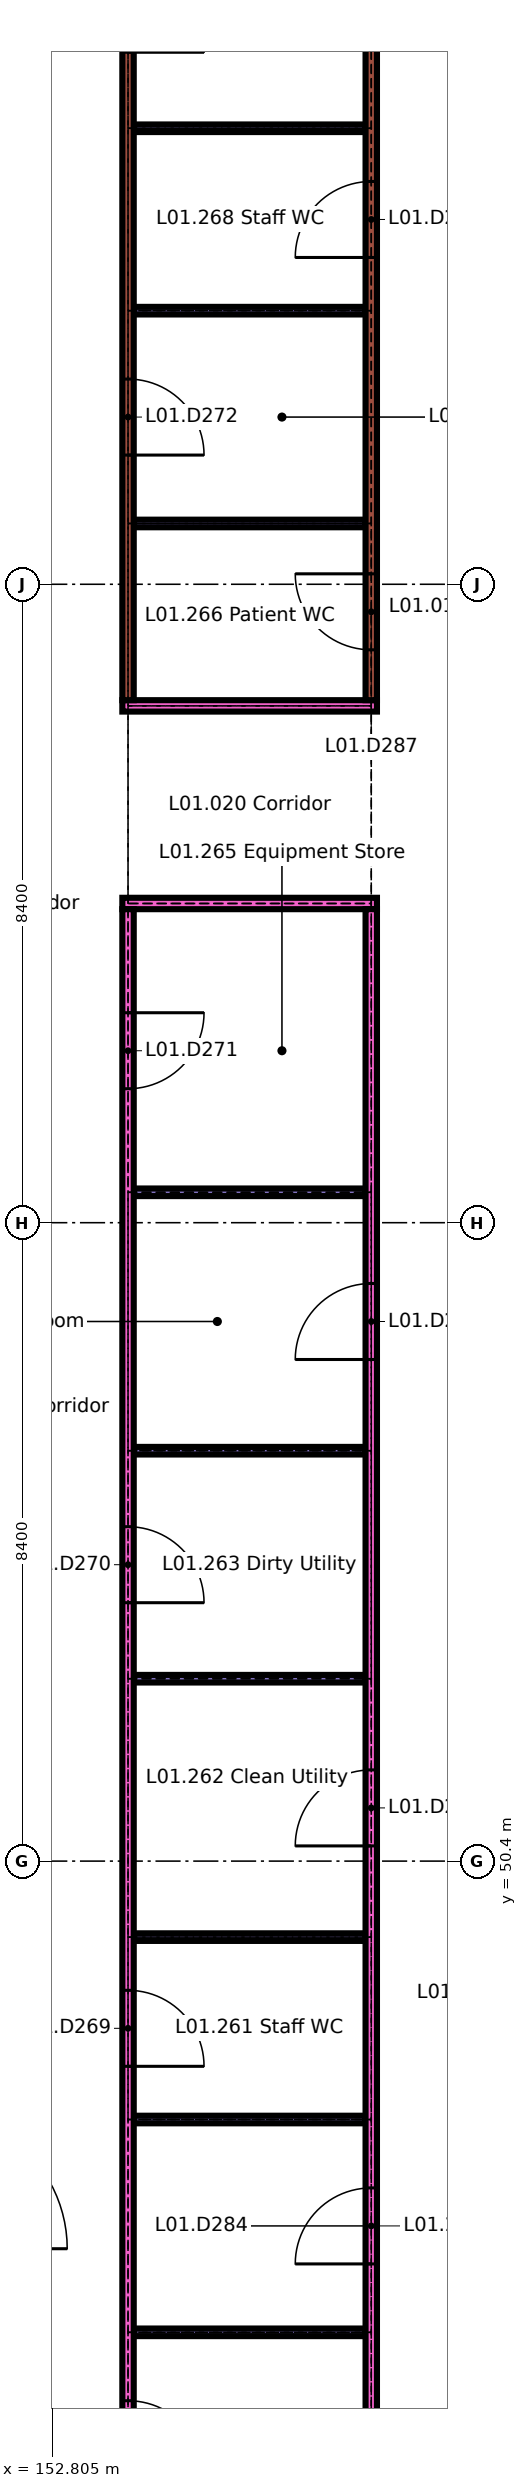
"""IFC4 building model, lengths in metres.
Left out: names, types, materials, properties, quantities, classifications, styles, units other than length and angle.
Written with IfcOpenShell. Run it as: python <this file> out.ifc"""

import sys

from ifc_helpers import new_model, si_unit, direction, frame, frame_2d, origin, place, context, subcontext, project, spatial, rectangle, extrude, element, fill, save


model = new_model("IFC4")
c1 = context("Model", 3, precision=1e-05, world=origin(), true_north=direction((0.0, 1.0)))
c2 = subcontext(c1, "Body", "Model", "MODEL_VIEW")
j1 = project(units=[si_unit("LENGTHUNIT", "METRE"), si_unit("PLANEANGLEUNIT", "RADIAN")], contexts=[c1])
p1 = place(None, origin())
s1 = spatial("IfcSite", under=j1, at=p1, CompositionType="ELEMENT")
p2 = place(p1, origin())
s2 = spatial("IfcBuilding", under=s1, at=p2, CompositionType="ELEMENT")
p3 = place(p2, frame((0.0, 0.0, 4.5)))
s3 = spatial("IfcBuildingStorey", under=s2, at=p3, CompositionType="ELEMENT", Elevation=4.5)
for number, where, z_axis, x_axis in (
    (1, (153.875, 44.2, 0.0), (0.0, 0.0, 1.0), (1.0, 0.0, 0.0)),
    (2, (153.875, 47.0, 0.0), (0.0, 0.0, 1.0), (1.0, 0.0, 0.0)),
    (3, (153.875, 49.4, 0.0), (0.0, 0.0, 1.0), (1.0, 0.0, 0.0)),
    (4, (153.875, 52.8, 0.0), (0.0, 0.0, 1.0), (1.0, 0.0, 0.0)),
    (5, (153.875, 55.8, 0.0), (0.0, 0.0, 1.0), (1.0, 0.0, 0.0)),
    (6, (153.875, 59.2, 0.0), (0.0, 0.0, 1.0), (1.0, 0.0, 0.0)),
):
    element("IfcWall", number, at=place(p3, frame(where, z_axis=z_axis, x_axis=x_axis)), inside=s3, PredefinedType="PARTITIONING", context=c2, shape_type="SweptSolid", body=[
        extrude(rectangle(XDim=3.05, YDim=0.1, at=frame_2d((1.525, 0.0))), origin(), (0.0, 0.0, 1.0), 3.6),
    ])
for number, where, z_axis, x_axis in (
    (7, (153.725, 63.0, 0.0), (0.0, 0.0, 1.0), (1.0, 0.0, 0.0)),
    (8, (153.725, 65.6, 0.0), (0.0, 0.0, 1.0), (1.0, 0.0, 0.0)),
):
    element("IfcWall", number, at=place(p3, frame(where, z_axis=z_axis, x_axis=x_axis)), inside=s3, PredefinedType="PARTITIONING", context=c2, shape_type="SweptSolid", body=[
        extrude(rectangle(XDim=3.35, YDim=0.15, at=frame_2d((1.675, 0.0))), origin(), (0.0, 0.0, 1.0), 3.6),
    ])
for number, where, z_axis, x_axis in (
    (9, (153.875, 68.0, 0.0), (0.0, 0.0, 1.0), (1.0, 0.0, 0.0)),
    (10, (153.875, 70.8, 0.0), (0.0, 0.0, 1.0), (1.0, 0.0, 0.0)),
    (11, (153.875, 73.2, 0.0), (0.0, 0.0, 1.0), (1.0, 0.0, 0.0)),
):
    element("IfcWall", number, at=place(p3, frame(where, z_axis=z_axis, x_axis=x_axis)), inside=s3, PredefinedType="PARTITIONING", context=c2, shape_type="SweptSolid", body=[
        extrude(rectangle(XDim=3.05, YDim=0.1, at=frame_2d((1.525, 0.0))), origin(), (0.0, 0.0, 1.0), 3.6),
    ])
p4 = place(p3, frame((153.8, 36.275, 0.0), z_axis=(0.0, 0.0, 1.0), x_axis=(0.0, 1.0, 0.0)))
e12 = element("IfcWall", 12, at=p4, inside=s3, PredefinedType="PARTITIONING", context=c2, shape_type="SweptSolid", body=[
    extrude(rectangle(XDim=26.65, YDim=0.15, at=frame_2d((13.325, 0.0))), origin(), (0.0, 0.0, 1.0), 3.6),
])
p5 = place(p4, frame((0.663, 0.0, 0.0)))
e13 = element("IfcOpeningElement", 13, at=p5, cuts=e12, PredefinedType="OPENING", context=c2, shape_type="SweptSolid", body=[
    extrude(rectangle(XDim=1.0, YDim=2.1, at=frame_2d((0.5, 1.05))), frame((0.0, 0.085, 0.0), z_axis=(0.0, -1.0, 0.0), x_axis=(1.0, 0.0, 0.0)), (0.0, 0.0, 1.0), 0.17),
])
p6 = place(p4, frame((6.025, 0.0, 0.0)))
e14 = element("IfcOpeningElement", 14, at=p6, cuts=e12, PredefinedType="OPENING", context=c2, shape_type="SweptSolid", body=[
    extrude(rectangle(XDim=1.0, YDim=2.1, at=frame_2d((0.5, 1.05))), frame((0.0, 0.085, 0.0), z_axis=(0.0, -1.0, 0.0), x_axis=(1.0, 0.0, 0.0)), (0.0, 0.0, 1.0), 0.17),
])
p7 = place(p4, frame((11.425, 0.0, 0.0)))
e15 = element("IfcOpeningElement", 15, at=p7, cuts=e12, PredefinedType="OPENING", context=c2, shape_type="SweptSolid", body=[
    extrude(rectangle(XDim=1.0, YDim=2.1, at=frame_2d((0.5, 1.05))), frame((0.0, 0.085, 0.0), z_axis=(0.0, -1.0, 0.0), x_axis=(1.0, 0.0, 0.0)), (0.0, 0.0, 1.0), 0.17),
])
p8 = place(p4, frame((17.525, 0.0, 0.0)))
e16 = element("IfcOpeningElement", 16, at=p8, cuts=e12, PredefinedType="OPENING", context=c2, shape_type="SweptSolid", body=[
    extrude(rectangle(XDim=1.0, YDim=2.1, at=frame_2d((0.5, 1.05))), frame((0.0, 0.085, 0.0), z_axis=(0.0, -1.0, 0.0), x_axis=(1.0, 0.0, 0.0)), (0.0, 0.0, 1.0), 0.17),
])
p9 = place(p4, frame((24.288, 0.0, 0.0)))
e17 = element("IfcOpeningElement", 17, at=p9, cuts=e12, PredefinedType="OPENING", context=c2, shape_type="SweptSolid", body=[
    extrude(rectangle(XDim=1.0, YDim=2.1, at=frame_2d((0.5, 1.05))), frame((0.0, 0.085, 0.0), z_axis=(0.0, -1.0, 0.0), x_axis=(1.0, 0.0, 0.0)), (0.0, 0.0, 1.0), 0.17),
])
p10 = place(p3, frame((153.8, 65.675, 0.0), z_axis=(0.0, 0.0, 1.0), x_axis=(0.0, 1.0, 0.0)))
e18 = element("IfcWall", 18, at=p10, inside=s3, PredefinedType="PARTITIONING", context=c2, shape_type="SweptSolid", body=[
    extrude(rectangle(XDim=25.25, YDim=0.15, at=frame_2d((12.625, 0.0))), origin(), (0.0, 0.0, 1.0), 3.45),
])
p11 = place(p10, frame((3.225, 0.0, 0.0)))
e19 = element("IfcOpeningElement", 19, at=p11, cuts=e18, PredefinedType="OPENING", context=c2, shape_type="SweptSolid", body=[
    extrude(rectangle(XDim=1.0, YDim=2.1, at=frame_2d((0.5, 1.05))), frame((0.0, 0.085, 0.0), z_axis=(0.0, -1.0, 0.0), x_axis=(1.0, 0.0, 0.0)), (0.0, 0.0, 1.0), 0.17),
])
p12 = place(p10, frame((8.525, 0.0, 0.0)))
e20 = element("IfcOpeningElement", 20, at=p12, cuts=e18, PredefinedType="OPENING", context=c2, shape_type="SweptSolid", body=[
    extrude(rectangle(XDim=1.0, YDim=2.1, at=frame_2d((0.5, 1.05))), frame((0.0, 0.085, 0.0), z_axis=(0.0, -1.0, 0.0), x_axis=(1.0, 0.0, 0.0)), (0.0, 0.0, 1.0), 0.17),
])
p13 = place(p10, frame((14.525, 0.0, 0.0)))
e21 = element("IfcOpeningElement", 21, at=p13, cuts=e18, PredefinedType="OPENING", context=c2, shape_type="SweptSolid", body=[
    extrude(rectangle(XDim=1.0, YDim=2.1, at=frame_2d((0.5, 1.05))), frame((0.0, 0.085, 0.0), z_axis=(0.0, -1.0, 0.0), x_axis=(1.0, 0.0, 0.0)), (0.0, 0.0, 1.0), 0.17),
])
p14 = place(p10, frame((20.125, 0.0, 0.0)))
e22 = element("IfcOpeningElement", 22, at=p14, cuts=e18, PredefinedType="OPENING", context=c2, shape_type="SweptSolid", body=[
    extrude(rectangle(XDim=1.0, YDim=2.1, at=frame_2d((0.5, 1.05))), frame((0.0, 0.085, 0.0), z_axis=(0.0, -1.0, 0.0), x_axis=(1.0, 0.0, 0.0)), (0.0, 0.0, 1.0), 0.17),
])
p15 = place(p3, frame((157.0, 36.275, 0.0), z_axis=(0.0, 0.0, 1.0), x_axis=(0.0, 1.0, 0.0)))
e23 = element("IfcWall", 23, at=p15, inside=s3, PredefinedType="PARTITIONING", context=c2, shape_type="SweptSolid", body=[
    extrude(rectangle(XDim=26.65, YDim=0.15, at=frame_2d((13.325, 0.0))), origin(), (0.0, 0.0, 1.0), 3.6),
])
p16 = place(p15, frame((3.225, 0.0, 0.0)))
e24 = element("IfcOpeningElement", 24, at=p16, cuts=e23, PredefinedType="OPENING", context=c2, shape_type="SweptSolid", body=[
    extrude(rectangle(XDim=1.0, YDim=2.1, at=frame_2d((0.5, 1.05))), frame((0.0, 0.085, 0.0), z_axis=(0.0, -1.0, 0.0), x_axis=(1.0, 0.0, 0.0)), (0.0, 0.0, 1.0), 0.17),
])
p17 = place(p15, frame((8.825, 0.0, 0.0)))
e25 = element("IfcOpeningElement", 25, at=p17, cuts=e23, PredefinedType="OPENING", context=c2, shape_type="SweptSolid", body=[
    extrude(rectangle(XDim=1.0, YDim=2.1, at=frame_2d((0.5, 1.05))), frame((0.0, 0.085, 0.0), z_axis=(0.0, -1.0, 0.0), x_axis=(1.0, 0.0, 0.0)), (0.0, 0.0, 1.0), 0.17),
])
p18 = place(p15, frame((14.325, 0.0, 0.0)))
e26 = element("IfcOpeningElement", 26, at=p18, cuts=e23, PredefinedType="OPENING", context=c2, shape_type="SweptSolid", body=[
    extrude(rectangle(XDim=1.0, YDim=2.1, at=frame_2d((0.5, 1.05))), frame((0.0, 0.085, 0.0), z_axis=(0.0, -1.0, 0.0), x_axis=(1.0, 0.0, 0.0)), (0.0, 0.0, 1.0), 0.17),
])
p19 = place(p15, frame((20.725, 0.0, 0.0)))
e27 = element("IfcOpeningElement", 27, at=p19, cuts=e23, PredefinedType="OPENING", context=c2, shape_type="SweptSolid", body=[
    extrude(rectangle(XDim=1.0, YDim=2.1, at=frame_2d((0.5, 1.05))), frame((0.0, 0.085, 0.0), z_axis=(0.0, -1.0, 0.0), x_axis=(1.0, 0.0, 0.0)), (0.0, 0.0, 1.0), 0.17),
])
p20 = place(p3, frame((157.0, 65.675, 0.0), z_axis=(0.0, 0.0, 1.0), x_axis=(0.0, 1.0, 0.0)))
e28 = element("IfcWall", 28, at=p20, inside=s3, PredefinedType="PARTITIONING", context=c2, shape_type="SweptSolid", body=[
    extrude(rectangle(XDim=25.25, YDim=0.15, at=frame_2d((12.625, 0.0))), origin(), (0.0, 0.0, 1.0), 3.45),
])
p21 = place(p20, frame((0.663, 0.0, 0.0)))
e29 = element("IfcOpeningElement", 29, at=p21, cuts=e28, PredefinedType="OPENING", context=c2, shape_type="SweptSolid", body=[
    extrude(rectangle(XDim=1.0, YDim=2.1, at=frame_2d((0.5, 1.05))), frame((0.0, 0.085, 0.0), z_axis=(0.0, -1.0, 0.0), x_axis=(1.0, 0.0, 0.0)), (0.0, 0.0, 1.0), 0.17),
])
p22 = place(p20, frame((5.825, 0.0, 0.0)))
e30 = element("IfcOpeningElement", 30, at=p22, cuts=e28, PredefinedType="OPENING", context=c2, shape_type="SweptSolid", body=[
    extrude(rectangle(XDim=1.0, YDim=2.1, at=frame_2d((0.5, 1.05))), frame((0.0, 0.085, 0.0), z_axis=(0.0, -1.0, 0.0), x_axis=(1.0, 0.0, 0.0)), (0.0, 0.0, 1.0), 0.17),
])
p23 = place(p20, frame((11.525, 0.0, 0.0)))
e31 = element("IfcOpeningElement", 31, at=p23, cuts=e28, PredefinedType="OPENING", context=c2, shape_type="SweptSolid", body=[
    extrude(rectangle(XDim=1.0, YDim=2.1, at=frame_2d((0.5, 1.05))), frame((0.0, 0.085, 0.0), z_axis=(0.0, -1.0, 0.0), x_axis=(1.0, 0.0, 0.0)), (0.0, 0.0, 1.0), 0.17),
])
p24 = place(p20, frame((17.225, 0.0, 0.0)))
e32 = element("IfcOpeningElement", 32, at=p24, cuts=e28, PredefinedType="OPENING", context=c2, shape_type="SweptSolid", body=[
    extrude(rectangle(XDim=1.0, YDim=2.1, at=frame_2d((0.5, 1.05))), frame((0.0, 0.085, 0.0), z_axis=(0.0, -1.0, 0.0), x_axis=(1.0, 0.0, 0.0)), (0.0, 0.0, 1.0), 0.17),
])
p25 = place(p20, frame((23.288, 0.0, 0.0)))
e33 = element("IfcOpeningElement", 33, at=p25, cuts=e28, PredefinedType="OPENING", context=c2, shape_type="SweptSolid", body=[
    extrude(rectangle(XDim=1.0, YDim=2.1, at=frame_2d((0.5, 1.05))), frame((0.0, 0.085, 0.0), z_axis=(0.0, -1.0, 0.0), x_axis=(1.0, 0.0, 0.0)), (0.0, 0.0, 1.0), 0.17),
])
p26 = place(p6, origin())
e34 = element("IfcDoor", 34, at=p26, inside=s3, OperationType="SINGLE_SWING_LEFT", PredefinedType="DOOR", context=c2, shape_type="SweptSolid", body=[
    extrude(rectangle(XDim=1.0, YDim=2.1, at=frame_2d((0.5, 1.05))), frame((0.0, 0.025, 0.0), z_axis=(0.0, -1.0, 0.0), x_axis=(1.0, 0.0, 0.0)), (0.0, 0.0, 1.0), 0.05),
])
fill(e14, e34)
p27 = place(p7, origin())
e35 = element("IfcDoor", 35, at=p27, inside=s3, OperationType="SINGLE_SWING_LEFT", PredefinedType="DOOR", context=c2, shape_type="SweptSolid", body=[
    extrude(rectangle(XDim=1.0, YDim=2.1, at=frame_2d((0.5, 1.05))), frame((0.0, 0.025, 0.0), z_axis=(0.0, -1.0, 0.0), x_axis=(1.0, 0.0, 0.0)), (0.0, 0.0, 1.0), 0.05),
])
fill(e15, e35)
p28 = place(p8, origin())
e36 = element("IfcDoor", 36, at=p28, inside=s3, OperationType="SINGLE_SWING_LEFT", PredefinedType="DOOR", context=c2, shape_type="SweptSolid", body=[
    extrude(rectangle(XDim=1.0, YDim=2.1, at=frame_2d((0.5, 1.05))), frame((0.0, 0.025, 0.0), z_axis=(0.0, -1.0, 0.0), x_axis=(1.0, 0.0, 0.0)), (0.0, 0.0, 1.0), 0.05),
])
fill(e16, e36)
p29 = place(p9, origin())
e37 = element("IfcDoor", 37, at=p29, inside=s3, OperationType="SINGLE_SWING_RIGHT", PredefinedType="DOOR", context=c2, shape_type="SweptSolid", body=[
    extrude(rectangle(XDim=1.0, YDim=2.1, at=frame_2d((0.5, 1.05))), frame((0.0, 0.025, 0.0), z_axis=(0.0, -1.0, 0.0), x_axis=(1.0, 0.0, 0.0)), (0.0, 0.0, 1.0), 0.05),
])
fill(e17, e37)
p30 = place(p11, origin())
e38 = element("IfcDoor", 38, at=p30, inside=s3, OperationType="SINGLE_SWING_LEFT", PredefinedType="DOOR", context=c2, shape_type="SweptSolid", body=[
    extrude(rectangle(XDim=1.0, YDim=2.1, at=frame_2d((0.5, 1.05))), frame((0.0, 0.025, 0.0), z_axis=(0.0, -1.0, 0.0), x_axis=(1.0, 0.0, 0.0)), (0.0, 0.0, 1.0), 0.05),
])
fill(e19, e38)
p31 = place(p17, origin())
e39 = element("IfcDoor", 39, at=p31, inside=s3, OperationType="SINGLE_SWING_RIGHT", PredefinedType="DOOR", context=c2, shape_type="SweptSolid", body=[
    extrude(rectangle(XDim=1.0, YDim=2.1, at=frame_2d((0.5, 1.05))), frame((0.0, 0.025, 0.0), z_axis=(0.0, -1.0, 0.0), x_axis=(1.0, 0.0, 0.0)), (0.0, 0.0, 1.0), 0.05),
])
fill(e25, e39)
p32 = place(p18, origin())
e40 = element("IfcDoor", 40, at=p32, inside=s3, OperationType="SINGLE_SWING_RIGHT", PredefinedType="DOOR", context=c2, shape_type="SweptSolid", body=[
    extrude(rectangle(XDim=1.0, YDim=2.1, at=frame_2d((0.5, 1.05))), frame((0.0, 0.025, 0.0), z_axis=(0.0, -1.0, 0.0), x_axis=(1.0, 0.0, 0.0)), (0.0, 0.0, 1.0), 0.05),
])
fill(e26, e40)
p33 = place(p19, origin())
e41 = element("IfcDoor", 41, at=p33, inside=s3, OperationType="SINGLE_SWING_RIGHT", PredefinedType="DOOR", context=c2, shape_type="SweptSolid", body=[
    extrude(rectangle(XDim=1.0, YDim=2.1, at=frame_2d((0.5, 1.05))), frame((0.0, 0.025, 0.0), z_axis=(0.0, -1.0, 0.0), x_axis=(1.0, 0.0, 0.0)), (0.0, 0.0, 1.0), 0.05),
])
fill(e27, e41)
p34 = place(p21, origin())
e42 = element("IfcDoor", 42, at=p34, inside=s3, OperationType="SINGLE_SWING_LEFT", PredefinedType="DOOR", context=c2, shape_type="SweptSolid", body=[
    extrude(rectangle(XDim=1.0, YDim=2.1, at=frame_2d((0.5, 1.05))), frame((0.0, 0.025, 0.0), z_axis=(0.0, -1.0, 0.0), x_axis=(1.0, 0.0, 0.0)), (0.0, 0.0, 1.0), 0.05),
])
fill(e29, e42)
p35 = place(p22, origin())
e43 = element("IfcDoor", 43, at=p35, inside=s3, OperationType="SINGLE_SWING_RIGHT", PredefinedType="DOOR", context=c2, shape_type="SweptSolid", body=[
    extrude(rectangle(XDim=1.0, YDim=2.1, at=frame_2d((0.5, 1.05))), frame((0.0, 0.025, 0.0), z_axis=(0.0, -1.0, 0.0), x_axis=(1.0, 0.0, 0.0)), (0.0, 0.0, 1.0), 0.05),
])
fill(e30, e43)
save(model, sys.argv[1])
